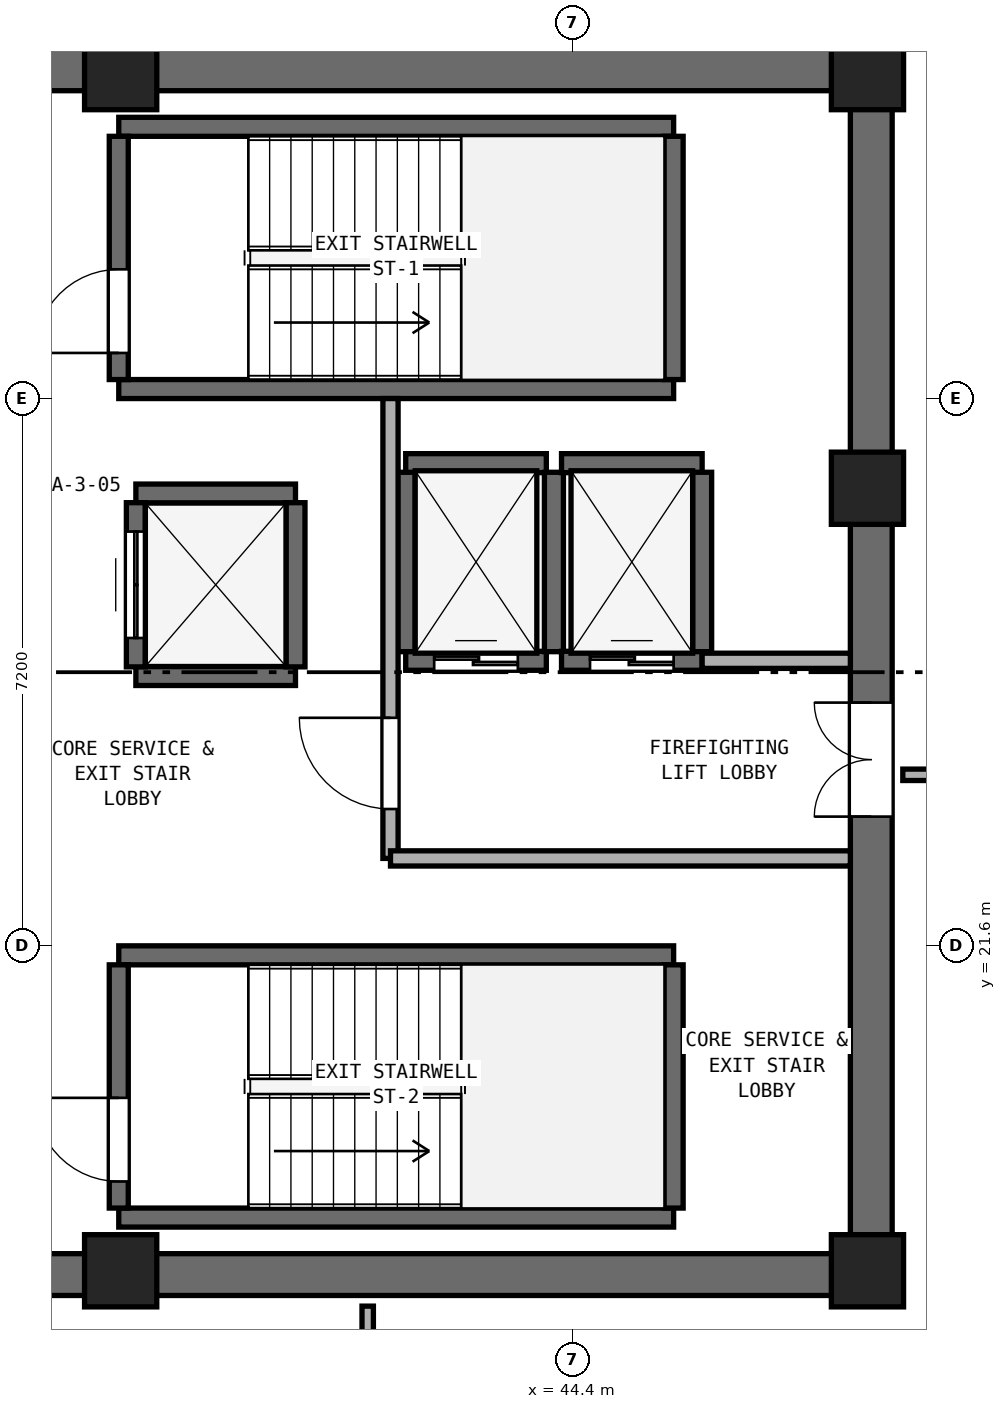
"""IFC4 building model, lengths in metres.
Left out: names, types, materials, properties, quantities, classifications, styles, units other than length and angle.
Written with IfcOpenShell. Run it as: python <this file> out.ifc"""

import sys

from ifc_helpers import new_model, si_unit, direction, frame, frame_2d, origin, origin_2d, place, context, subcontext, project, spatial, rectangle, extrude, element, fill, save


model = new_model("IFC4")
c1 = context("Model", 3, precision=1e-05, world=origin(), true_north=direction((0.0, 1.0)))
c2 = subcontext(c1, "Body", "Model", "MODEL_VIEW")
j1 = project(units=[si_unit("LENGTHUNIT", "METRE"), si_unit("PLANEANGLEUNIT", "RADIAN")], contexts=[c1])
p1 = place(None, origin())
s1 = spatial("IfcSite", under=j1, at=p1, CompositionType="ELEMENT")
p2 = place(p1, origin())
s2 = spatial("IfcBuilding", under=s1, at=p2, CompositionType="ELEMENT")
p3 = place(p2, frame((0.0, 0.0, 193.4)))
s3 = spatial("IfcBuildingStorey", under=s2, at=p3, CompositionType="ELEMENT", Elevation=193.4)
for number, where, z_axis, x_axis in (
    (1, (25.4, 17.275, 0.0), (0.0, 0.0, 1.0), (1.0, 0.0, 0.0)),
    (2, (25.4, 33.125, 0.0), (0.0, 0.0, 1.0), (1.0, 0.0, 0.0)),
):
    element("IfcWall", number, at=place(p3, frame(where, z_axis=z_axis, x_axis=x_axis)), inside=s3, PredefinedType="SHEAR", context=c2, shape_type="SweptSolid", body=[
        extrude(rectangle(XDim=23.2, YDim=0.55, at=frame_2d((11.6, 0.0))), origin(), (0.0, 0.0, 1.0), 3.54),
    ])
p4 = place(p3, frame((48.325, 17.55, 0.0), z_axis=(0.0, 0.0, 1.0), x_axis=(0.0, 1.0, 0.0)))
e3 = element("IfcWall", 3, at=p4, inside=s3, PredefinedType="SHEAR", context=c2, shape_type="SweptSolid", body=[
    extrude(rectangle(XDim=15.3, YDim=0.55, at=frame_2d((7.65, 0.0))), origin(), (0.0, 0.0, 1.0), 3.54),
])
p5 = place(p4, frame((5.75, 0.0, 0.0)))
e4 = element("IfcOpeningElement", 4, at=p5, cuts=e3, PredefinedType="OPENING", context=c2, shape_type="SweptSolid", body=[
    extrude(rectangle(XDim=1.5, YDim=2.15, at=frame_2d((0.75, 1.075))), frame((0.0, 0.285, 0.0), z_axis=(0.0, -1.0, 0.0), x_axis=(1.0, 0.0, 0.0)), (0.0, 0.0, 1.0), 0.57),
])
for number, where, z_axis, x_axis in (
    (5, (38.45, 17.325, 0.0), (0.0, 0.0, 1.0), (1.0, 0.0, 0.0)),
    (6, (48.275, 17.325, 0.0), (0.0, 0.0, 1.0), (1.0, 0.0, 0.0)),
    (7, (48.275, 27.62, 0.0), (0.0, 0.0, 1.0), (1.0, 0.0, 0.0)),
    (8, (48.275, 33.075, 0.0), (0.0, 0.0, 1.0), (1.0, 0.0, 0.0)),
    (9, (38.45, 33.075, 0.0), (0.0, 0.0, 1.0), (1.0, 0.0, 0.0)),
):
    element("IfcColumn", number, at=place(p3, frame(where, z_axis=z_axis, x_axis=x_axis)), inside=s3, PredefinedType="PILASTER", context=c2, shape_type="SweptSolid", body=[
        extrude(rectangle(XDim=0.95, YDim=0.95, at=origin_2d()), origin(), (0.0, 0.0, 1.0), 3.8),
    ])
for number, where, z_axis, x_axis in (
    (10, (38.425, 28.925, 0.0), (0.0, 0.0, 1.0), (1.0, 0.0, 0.0)),
    (11, (38.425, 32.375, 0.0), (0.0, 0.0, 1.0), (1.0, 0.0, 0.0)),
):
    element("IfcWall", number, at=place(p3, frame(where, z_axis=z_axis, x_axis=x_axis)), inside=s3, PredefinedType="SHEAR", context=c2, shape_type="SweptSolid", body=[
        extrude(rectangle(XDim=7.3, YDim=0.25, at=frame_2d((3.65, 0.0))), origin(), (0.0, 0.0, 1.0), 3.54),
    ])
p6 = place(p3, frame((38.425, 29.05, 0.0), z_axis=(0.0, 0.0, 1.0), x_axis=(0.0, 1.0, 0.0)))
e12 = element("IfcWall", 12, at=p6, inside=s3, PredefinedType="SHEAR", context=c2, shape_type="SweptSolid", body=[
    extrude(rectangle(XDim=3.2, YDim=0.25, at=frame_2d((1.6, 0.0))), origin(), (0.0, 0.0, 1.0), 3.54),
])
p7 = place(p6, frame((0.35, 0.0, 0.0)))
e13 = element("IfcOpeningElement", 13, at=p7, cuts=e12, PredefinedType="OPENING", context=c2, shape_type="SweptSolid", body=[
    extrude(rectangle(XDim=1.1, YDim=2.15, at=frame_2d((0.55, 1.075))), frame((0.0, 0.135, 0.0), z_axis=(0.0, -1.0, 0.0), x_axis=(1.0, 0.0, 0.0)), (0.0, 0.0, 1.0), 0.27),
])
p8 = place(p3, frame((45.725, 29.05, 0.0), z_axis=(0.0, 0.0, 1.0), x_axis=(0.0, 1.0, 0.0)))
e14 = element("IfcWall", 14, at=p8, inside=s3, PredefinedType="SHEAR", context=c2, shape_type="SweptSolid", body=[
    extrude(rectangle(XDim=3.2, YDim=0.25, at=frame_2d((1.6, 0.0))), origin(), (0.0, 0.0, 1.0), 3.54),
])
for number, where, z_axis, x_axis in (
    (15, (38.425, 18.025, 0.0), (0.0, 0.0, 1.0), (1.0, 0.0, 0.0)),
    (16, (38.425, 21.475, 0.0), (0.0, 0.0, 1.0), (1.0, 0.0, 0.0)),
):
    element("IfcWall", number, at=place(p3, frame(where, z_axis=z_axis, x_axis=x_axis)), inside=s3, PredefinedType="SHEAR", context=c2, shape_type="SweptSolid", body=[
        extrude(rectangle(XDim=7.3, YDim=0.25, at=frame_2d((3.65, 0.0))), origin(), (0.0, 0.0, 1.0), 3.54),
    ])
p9 = place(p3, frame((38.425, 18.15, 0.0), z_axis=(0.0, 0.0, 1.0), x_axis=(0.0, 1.0, 0.0)))
e17 = element("IfcWall", 17, at=p9, inside=s3, PredefinedType="SHEAR", context=c2, shape_type="SweptSolid", body=[
    extrude(rectangle(XDim=3.2, YDim=0.25, at=frame_2d((1.6, 0.0))), origin(), (0.0, 0.0, 1.0), 3.54),
])
p10 = place(p9, frame((0.35, 0.0, 0.0)))
e18 = element("IfcOpeningElement", 18, at=p10, cuts=e17, PredefinedType="OPENING", context=c2, shape_type="SweptSolid", body=[
    extrude(rectangle(XDim=1.1, YDim=2.15, at=frame_2d((0.55, 1.075))), frame((0.0, 0.135, 0.0), z_axis=(0.0, -1.0, 0.0), x_axis=(1.0, 0.0, 0.0)), (0.0, 0.0, 1.0), 0.27),
])
p11 = place(p3, frame((45.725, 18.15, 0.0), z_axis=(0.0, 0.0, 1.0), x_axis=(0.0, 1.0, 0.0)))
e19 = element("IfcWall", 19, at=p11, inside=s3, PredefinedType="SHEAR", context=c2, shape_type="SweptSolid", body=[
    extrude(rectangle(XDim=3.2, YDim=0.25, at=frame_2d((1.6, 0.0))), origin(), (0.0, 0.0, 1.0), 3.54),
])
p12 = place(p3, frame((42.2, 25.35, 0.0), z_axis=(0.0, 0.0, 1.0), x_axis=(1.0, 0.0, 0.0)))
e20 = element("IfcWall", 20, at=p12, inside=s3, PredefinedType="SHEAR", context=c2, shape_type="SweptSolid", body=[
    extrude(rectangle(XDim=1.85, YDim=0.25, at=frame_2d((0.925, 0.0))), origin(), (0.0, 0.0, 1.0), 3.54),
])
p13 = place(p12, frame((0.375, 0.0, 0.0)))
e21 = element("IfcOpeningElement", 21, at=p13, cuts=e20, PredefinedType="OPENING", context=c2, shape_type="SweptSolid", body=[
    extrude(rectangle(XDim=1.1, YDim=2.15, at=frame_2d((0.55, 1.075))), frame((0.0, 0.135, 0.0), z_axis=(0.0, -1.0, 0.0), x_axis=(1.0, 0.0, 0.0)), (0.0, 0.0, 1.0), 0.27),
])
p14 = place(p3, frame((42.2, 27.95, 0.0), z_axis=(0.0, 0.0, 1.0), x_axis=(1.0, 0.0, 0.0)))
e22 = element("IfcWall", 22, at=p14, inside=s3, PredefinedType="SHEAR", context=c2, shape_type="SweptSolid", body=[
    extrude(rectangle(XDim=1.85, YDim=0.25, at=frame_2d((0.925, 0.0))), origin(), (0.0, 0.0, 1.0), 3.54),
])
for number, where, z_axis, x_axis in (
    (23, (42.2, 25.47, 0.0), (0.0, 0.0, 1.0), (0.0, 1.0, 0.0)),
    (24, (44.15, 25.47, 0.0), (0.0, 0.0, 1.0), (0.0, 1.0, 0.0)),
):
    element("IfcWall", number, at=place(p3, frame(where, z_axis=z_axis, x_axis=x_axis)), inside=s3, PredefinedType="SHEAR", context=c2, shape_type="SweptSolid", body=[
        extrude(rectangle(XDim=2.36, YDim=0.25, at=frame_2d((1.18, 0.0))), origin(), (0.0, 0.0, 1.0), 3.54),
    ])
p15 = place(p3, frame((44.25, 25.35, 0.0), z_axis=(0.0, 0.0, 1.0), x_axis=(1.0, 0.0, 0.0)))
e25 = element("IfcWall", 25, at=p15, inside=s3, PredefinedType="SHEAR", context=c2, shape_type="SweptSolid", body=[
    extrude(rectangle(XDim=1.85, YDim=0.25, at=frame_2d((0.925, 0.0))), origin(), (0.0, 0.0, 1.0), 3.54),
])
p16 = place(p15, frame((0.375, 0.0, 0.0)))
e26 = element("IfcOpeningElement", 26, at=p16, cuts=e25, PredefinedType="OPENING", context=c2, shape_type="SweptSolid", body=[
    extrude(rectangle(XDim=1.1, YDim=2.15, at=frame_2d((0.55, 1.075))), frame((0.0, 0.135, 0.0), z_axis=(0.0, -1.0, 0.0), x_axis=(1.0, 0.0, 0.0)), (0.0, 0.0, 1.0), 0.27),
])
p17 = place(p3, frame((44.25, 27.95, 0.0), z_axis=(0.0, 0.0, 1.0), x_axis=(1.0, 0.0, 0.0)))
e27 = element("IfcWall", 27, at=p17, inside=s3, PredefinedType="SHEAR", context=c2, shape_type="SweptSolid", body=[
    extrude(rectangle(XDim=1.85, YDim=0.25, at=frame_2d((0.925, 0.0))), origin(), (0.0, 0.0, 1.0), 3.54),
])
p18 = place(p3, frame((46.1, 25.47, 0.0), z_axis=(0.0, 0.0, 1.0), x_axis=(0.0, 1.0, 0.0)))
e28 = element("IfcWall", 28, at=p18, inside=s3, PredefinedType="SHEAR", context=c2, shape_type="SweptSolid", body=[
    extrude(rectangle(XDim=2.36, YDim=0.25, at=frame_2d((1.18, 0.0))), origin(), (0.0, 0.0, 1.0), 3.54),
])
for number, where, z_axis, x_axis in (
    (29, (38.65, 25.15, 0.0), (0.0, 0.0, 1.0), (1.0, 0.0, 0.0)),
    (30, (38.65, 27.55, 0.0), (0.0, 0.0, 1.0), (1.0, 0.0, 0.0)),
):
    element("IfcWall", number, at=place(p3, frame(where, z_axis=z_axis, x_axis=x_axis)), inside=s3, PredefinedType="SHEAR", context=c2, shape_type="SweptSolid", body=[
        extrude(rectangle(XDim=2.1, YDim=0.25, at=frame_2d((1.05, 0.0))), origin(), (0.0, 0.0, 1.0), 3.54),
    ])
p19 = place(p3, frame((38.65, 25.27, 0.0), z_axis=(0.0, 0.0, 1.0), x_axis=(0.0, 1.0, 0.0)))
e31 = element("IfcWall", 31, at=p19, inside=s3, PredefinedType="SHEAR", context=c2, shape_type="SweptSolid", body=[
    extrude(rectangle(XDim=2.16, YDim=0.25, at=frame_2d((1.08, 0.0))), origin(), (0.0, 0.0, 1.0), 3.54),
])
p20 = place(p19, frame((0.38, 0.0, 0.0)))
e32 = element("IfcOpeningElement", 32, at=p20, cuts=e31, PredefinedType="OPENING", context=c2, shape_type="SweptSolid", body=[
    extrude(rectangle(XDim=1.4, YDim=2.2, at=frame_2d((0.7, 1.1))), frame((0.0, 0.135, 0.0), z_axis=(0.0, -1.0, 0.0), x_axis=(1.0, 0.0, 0.0)), (0.0, 0.0, 1.0), 0.27),
])
p21 = place(p3, frame((40.75, 25.27, 0.0), z_axis=(0.0, 0.0, 1.0), x_axis=(0.0, 1.0, 0.0)))
e33 = element("IfcWall", 33, at=p21, inside=s3, PredefinedType="SHEAR", context=c2, shape_type="SweptSolid", body=[
    extrude(rectangle(XDim=2.16, YDim=0.25, at=frame_2d((1.08, 0.0))), origin(), (0.0, 0.0, 1.0), 3.54),
])
p22 = place(p3, frame((42.0, 22.75, 0.0), z_axis=(0.0, 0.0, 1.0), x_axis=(0.0, 1.0, 0.0)))
e34 = element("IfcWall", 34, at=p22, inside=s3, PredefinedType="SOLIDWALL", context=c2, shape_type="SweptSolid", body=[
    extrude(rectangle(XDim=6.05, YDim=0.2, at=frame_2d((3.025, 0.0))), origin(), (0.0, 0.0, 1.0), 3.54),
])
p23 = place(p22, frame((0.65, 0.0, 0.0)))
e35 = element("IfcOpeningElement", 35, at=p23, cuts=e34, PredefinedType="OPENING", context=c2, shape_type="SweptSolid", body=[
    extrude(rectangle(XDim=1.2, YDim=2.15, at=frame_2d((0.6, 1.075))), frame((0.0, 0.11, 0.0), z_axis=(0.0, -1.0, 0.0), x_axis=(1.0, 0.0, 0.0)), (0.0, 0.0, 1.0), 0.22),
])
p24 = place(p3, frame((42.0, 22.75, 0.0), z_axis=(0.0, 0.0, 1.0), x_axis=(1.0, 0.0, 0.0)))
e36 = element("IfcWall", 36, at=p24, inside=s3, PredefinedType="SOLIDWALL", context=c2, shape_type="SweptSolid", body=[
    extrude(rectangle(XDim=6.05, YDim=0.2, at=frame_2d((3.025, 0.0))), origin(), (0.0, 0.0, 1.0), 3.54),
])
p25 = place(p3, frame((46.1, 25.35, 0.0), z_axis=(0.0, 0.0, 1.0), x_axis=(1.0, 0.0, 0.0)))
e37 = element("IfcWall", 37, at=p25, inside=s3, PredefinedType="SOLIDWALL", context=c2, shape_type="SweptSolid", body=[
    extrude(rectangle(XDim=1.95, YDim=0.2, at=frame_2d((0.975, 0.0))), origin(), (0.0, 0.0, 1.0), 3.54),
])
p26 = place(p3, frame((41.7, 2.49, 0.0), z_axis=(0.0, 0.0, 1.0), x_axis=(0.0, 1.0, 0.0)))
e38 = element("IfcWall", 38, at=p26, inside=s3, PredefinedType="PARTITIONING", context=c2, shape_type="SweptSolid", body=[
    extrude(rectangle(XDim=14.37, YDim=0.15, at=frame_2d((7.185, 0.0))), origin(), (0.0, 0.0, 1.0), 3.54),
])
p27 = place(p3, frame((48.74, 23.85, 0.0), z_axis=(0.0, 0.0, 1.0), x_axis=(1.0, 0.0, 0.0)))
e39 = element("IfcWall", 39, at=p27, inside=s3, PredefinedType="PARTITIONING", context=c2, shape_type="SweptSolid", body=[
    extrude(rectangle(XDim=14.855, YDim=0.15, at=frame_2d((7.427, 0.0))), origin(), (0.0, 0.0, 1.0), 3.54),
])
p28 = place(p27, frame((6.978, 0.0, 0.0)))
e40 = element("IfcOpeningElement", 40, at=p28, cuts=e39, PredefinedType="OPENING", context=c2, shape_type="SweptSolid", body=[
    extrude(rectangle(XDim=0.9, YDim=2.1, at=frame_2d((0.45, 1.05))), frame((0.0, 0.085, 0.0), z_axis=(0.0, -1.0, 0.0), x_axis=(1.0, 0.0, 0.0)), (0.0, 0.0, 1.0), 0.17),
])
p29 = place(p7, origin())
e41 = element("IfcDoor", 41, at=p29, inside=s3, OperationType="SINGLE_SWING_LEFT", PredefinedType="DOOR", context=c2, shape_type="SweptSolid", body=[
    extrude(rectangle(XDim=1.1, YDim=2.15, at=frame_2d((0.55, 1.075))), frame((0.0, 0.025, 0.0), z_axis=(0.0, -1.0, 0.0), x_axis=(1.0, 0.0, 0.0)), (0.0, 0.0, 1.0), 0.05),
])
fill(e13, e41)
p30 = place(p10, origin())
e42 = element("IfcDoor", 42, at=p30, inside=s3, OperationType="SINGLE_SWING_RIGHT", PredefinedType="DOOR", context=c2, shape_type="SweptSolid", body=[
    extrude(rectangle(XDim=1.1, YDim=2.15, at=frame_2d((0.55, 1.075))), frame((0.0, 0.025, 0.0), z_axis=(0.0, -1.0, 0.0), x_axis=(1.0, 0.0, 0.0)), (0.0, 0.0, 1.0), 0.05),
])
fill(e18, e42)
p31 = place(p13, origin())
e43 = element("IfcDoor", 43, at=p31, inside=s3, OperationType="DOUBLE_DOOR_SLIDING", PredefinedType="DOOR", context=c2, shape_type="SweptSolid", body=[
    extrude(rectangle(XDim=1.1, YDim=2.15, at=frame_2d((0.55, 1.075))), frame((0.0, 0.025, 0.0), z_axis=(0.0, -1.0, 0.0), x_axis=(1.0, 0.0, 0.0)), (0.0, 0.0, 1.0), 0.05),
])
fill(e21, e43)
p32 = place(p16, origin())
e44 = element("IfcDoor", 44, at=p32, inside=s3, OperationType="DOUBLE_DOOR_SLIDING", PredefinedType="DOOR", context=c2, shape_type="SweptSolid", body=[
    extrude(rectangle(XDim=1.1, YDim=2.15, at=frame_2d((0.55, 1.075))), frame((0.0, 0.025, 0.0), z_axis=(0.0, -1.0, 0.0), x_axis=(1.0, 0.0, 0.0)), (0.0, 0.0, 1.0), 0.05),
])
fill(e26, e44)
p33 = place(p20, origin())
e45 = element("IfcDoor", 45, at=p33, inside=s3, OperationType="DOUBLE_DOOR_SLIDING", PredefinedType="DOOR", context=c2, shape_type="SweptSolid", body=[
    extrude(rectangle(XDim=1.4, YDim=2.2, at=frame_2d((0.7, 1.1))), frame((0.0, 0.025, 0.0), z_axis=(0.0, -1.0, 0.0), x_axis=(1.0, 0.0, 0.0)), (0.0, 0.0, 1.0), 0.05),
])
fill(e32, e45)
p34 = place(p23, origin())
e46 = element("IfcDoor", 46, at=p34, inside=s3, OperationType="SINGLE_SWING_RIGHT", PredefinedType="DOOR", context=c2, shape_type="SweptSolid", body=[
    extrude(rectangle(XDim=1.2, YDim=2.15, at=frame_2d((0.6, 1.075))), frame((0.0, 0.025, 0.0), z_axis=(0.0, -1.0, 0.0), x_axis=(1.0, 0.0, 0.0)), (0.0, 0.0, 1.0), 0.05),
])
fill(e35, e46)
p35 = place(p5, origin())
e47 = element("IfcDoor", 47, at=p35, inside=s3, OperationType="DOUBLE_DOOR_SINGLE_SWING", PredefinedType="DOOR", context=c2, shape_type="SweptSolid", body=[
    extrude(rectangle(XDim=1.5, YDim=2.15, at=frame_2d((0.75, 1.075))), frame((0.0, 0.025, 0.0), z_axis=(0.0, -1.0, 0.0), x_axis=(1.0, 0.0, 0.0)), (0.0, 0.0, 1.0), 0.05),
])
fill(e4, e47)
save(model, sys.argv[1])
